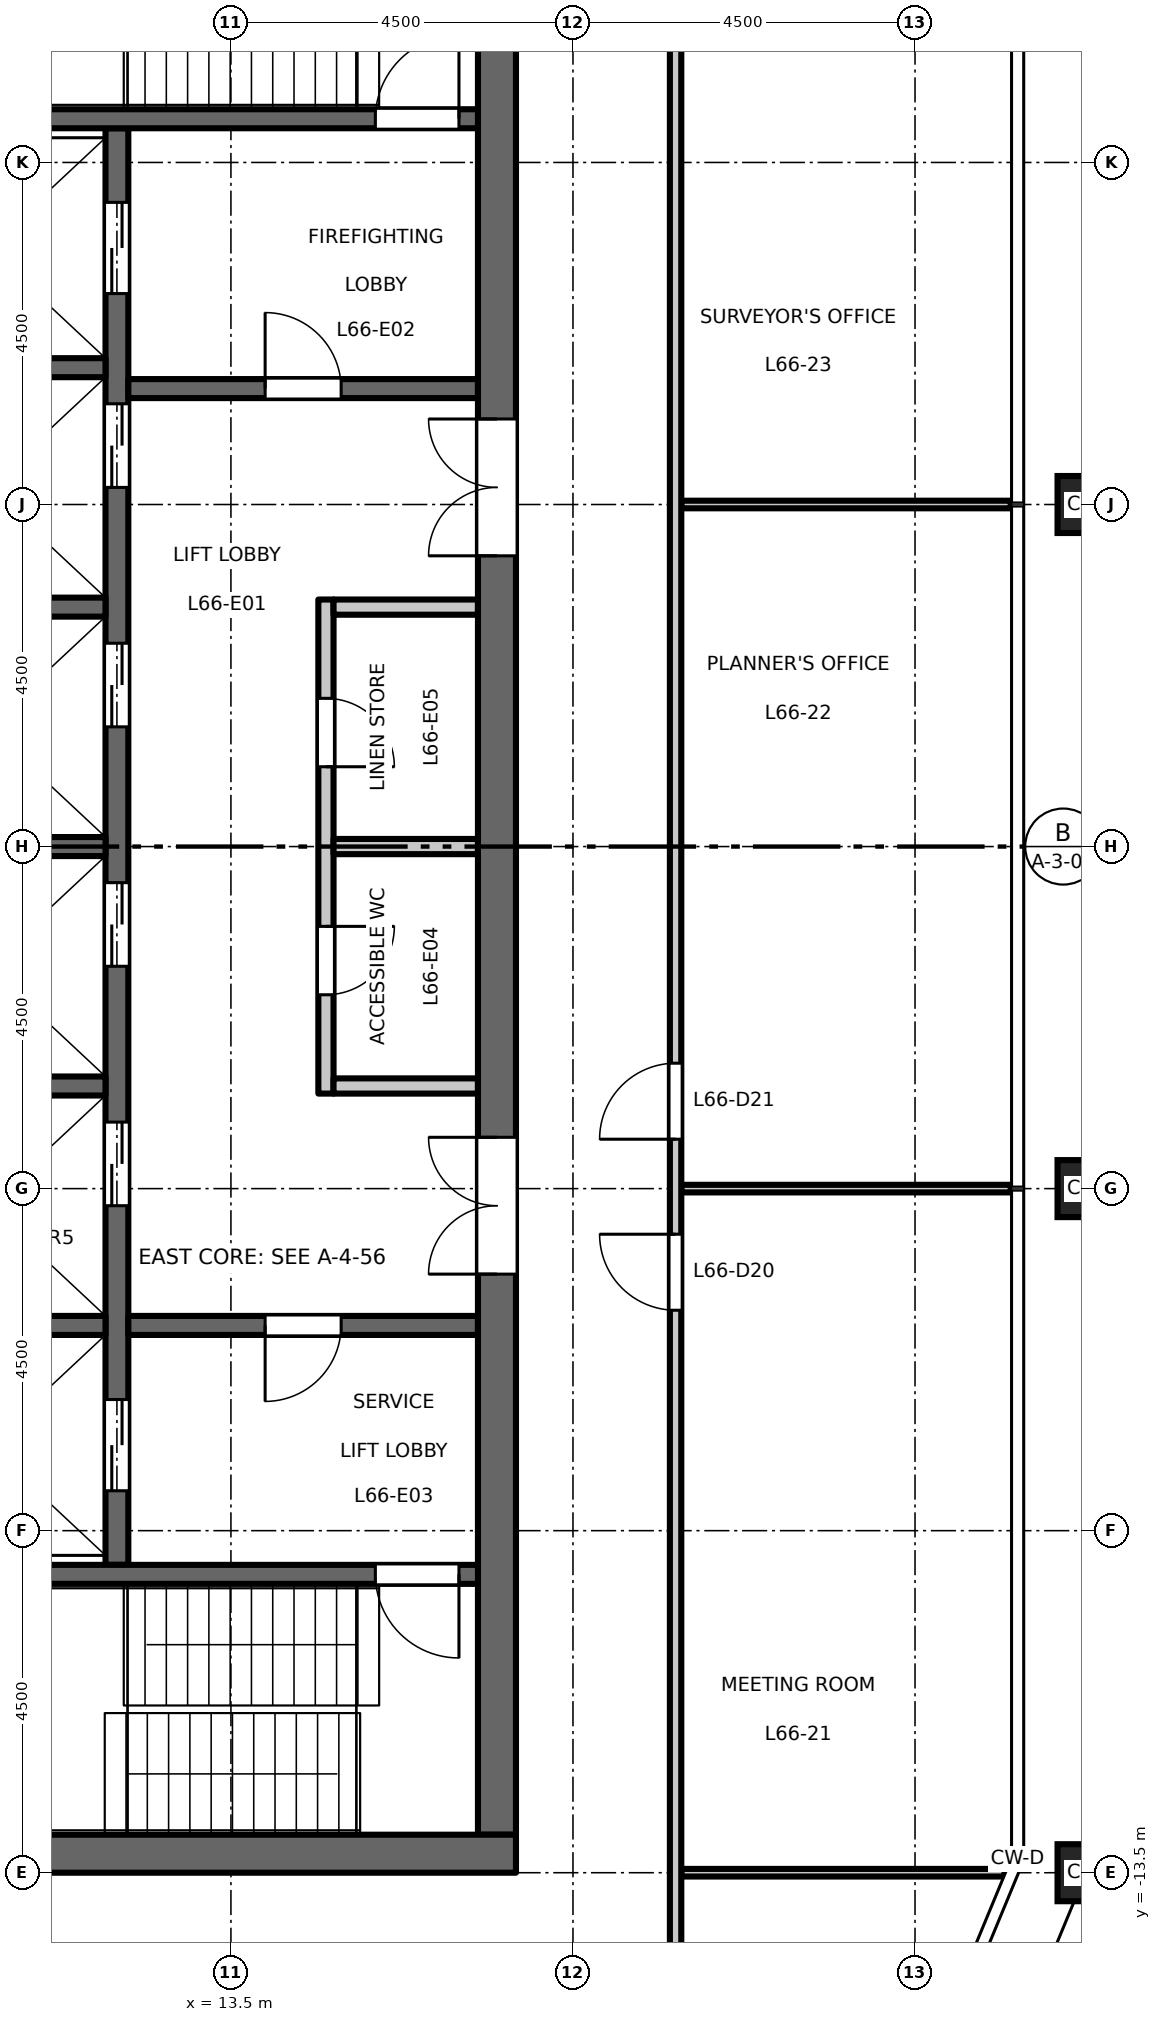
"""IFC4 building model, lengths in metres.
Left out: names, types, materials, properties, quantities, classifications, styles, units other than length and angle.
Written with IfcOpenShell. Run it as: python <this file> out.ifc"""

import sys

from ifc_helpers import new_model, si_unit, direction, frame, frame_2d, origin, origin_2d, place, context, subcontext, project, spatial, rectangle, hollow_rectangle, extrude, element, fill, save


model = new_model("IFC4")
c1 = context("Model", 3, precision=1e-05, world=origin(), true_north=direction((0.0, 1.0)))
c2 = subcontext(c1, "Body", "Model", "MODEL_VIEW")
j1 = project(units=[si_unit("LENGTHUNIT", "METRE"), si_unit("PLANEANGLEUNIT", "RADIAN")], contexts=[c1])
p1 = place(None, origin())
s1 = spatial("IfcSite", under=j1, at=p1, CompositionType="ELEMENT")
p2 = place(p1, origin())
s2 = spatial("IfcBuilding", under=s1, at=p2, CompositionType="ELEMENT")
p3 = place(p2, frame((0.0, 0.0, 307.7)))
s3 = spatial("IfcBuildingStorey", under=s2, at=p3, CompositionType="ELEMENT", Elevation=307.7)
for number, where, z_axis, x_axis in (
    (1, (24.75, -13.5, 0.0), (0.0, 0.0, 1.0), (1.0, 0.0, 0.0)),
    (2, (24.75, -4.5, 0.0), (0.0, 0.0, 1.0), (1.0, 0.0, 0.0)),
    (3, (24.75, 4.5, 0.0), (0.0, 0.0, 1.0), (1.0, 0.0, 0.0)),
):
    element("IfcColumn", number, at=place(p3, frame(where, z_axis=z_axis, x_axis=x_axis)), inside=s3, PredefinedType="COLUMN", context=c2, shape_type="SweptSolid", body=[
        extrude(hollow_rectangle(XDim=0.75, YDim=0.75, WallThickness=0.04, at=origin_2d()), origin(), (0.0, 0.0, 1.0), 4.5),
    ])
p4 = place(p3, frame((14.75, -3.25, 0.0), z_axis=(0.0, 0.0, 1.0), x_axis=(0.0, 1.0, 0.0)))
e4 = element("IfcWall", 4, at=p4, inside=s3, PredefinedType="PARTITIONING", context=c2, shape_type="SweptSolid", body=[
    extrude(rectangle(XDim=6.5, YDim=0.2, at=frame_2d((3.25, 0.0))), origin(), (0.0, 0.0, 1.0), 4.35),
])
p5 = place(p4, frame((1.3, 0.0, 0.0)))
e5 = element("IfcOpeningElement", 5, at=p5, cuts=e4, PredefinedType="OPENING", context=c2, shape_type="SweptSolid", body=[
    extrude(rectangle(XDim=0.9, YDim=2.1, at=frame_2d((0.45, 1.05))), frame((0.0, 0.11, 0.0), z_axis=(0.0, -1.0, 0.0), x_axis=(1.0, 0.0, 0.0)), (0.0, 0.0, 1.0), 0.22),
])
p6 = place(p4, frame((4.3, 0.0, 0.0)))
e6 = element("IfcOpeningElement", 6, at=p6, cuts=e4, PredefinedType="OPENING", context=c2, shape_type="SweptSolid", body=[
    extrude(rectangle(XDim=0.9, YDim=2.1, at=frame_2d((0.45, 1.05))), frame((0.0, 0.11, 0.0), z_axis=(0.0, -1.0, 0.0), x_axis=(1.0, 0.0, 0.0)), (0.0, 0.0, 1.0), 0.22),
])
for number, where, z_axis, x_axis in (
    (7, (14.85, 3.15, 0.0), (0.0, 0.0, 1.0), (1.0, 0.0, 0.0)),
    (8, (14.85, -3.15, 0.0), (0.0, 0.0, 1.0), (1.0, 0.0, 0.0)),
    (9, (14.85, 0.0, 0.0), (0.0, 0.0, 1.0), (1.0, 0.0, 0.0)),
):
    element("IfcWall", number, at=place(p3, frame(where, z_axis=z_axis, x_axis=x_axis)), inside=s3, PredefinedType="PARTITIONING", context=c2, shape_type="SweptSolid", body=[
        extrude(rectangle(XDim=1.9, YDim=0.2, at=frame_2d((0.95, 0.0))), origin(), (0.0, 0.0, 1.0), 4.35),
    ])
p7 = place(p3, frame((12.0, -9.45, 0.0), z_axis=(0.0, 0.0, 1.0), x_axis=(0.0, 1.0, 0.0)))
e10 = element("IfcWall", 10, at=p7, inside=s3, PredefinedType="SHEAR", context=c2, shape_type="SweptSolid", body=[
    extrude(rectangle(XDim=18.9, YDim=0.3, at=frame_2d((9.45, 0.0))), origin(), (0.0, 0.0, 1.0), 4.35),
])
p8 = place(p7, frame((4.725, 0.0, 0.0)))
e11 = element("IfcOpeningElement", 11, at=p8, cuts=e10, PredefinedType="OPENING", context=c2, shape_type="SweptSolid", body=[
    extrude(rectangle(XDim=1.1, YDim=2.1, at=frame_2d((0.55, 1.05))), frame((0.0, 0.16, 0.0), z_axis=(0.0, -1.0, 0.0), x_axis=(1.0, 0.0, 0.0)), (0.0, 0.0, 1.0), 0.32),
])
p9 = place(p7, frame((7.875, 0.0, 0.0)))
e12 = element("IfcOpeningElement", 12, at=p9, cuts=e10, PredefinedType="OPENING", context=c2, shape_type="SweptSolid", body=[
    extrude(rectangle(XDim=1.1, YDim=2.1, at=frame_2d((0.55, 1.05))), frame((0.0, 0.16, 0.0), z_axis=(0.0, -1.0, 0.0), x_axis=(1.0, 0.0, 0.0)), (0.0, 0.0, 1.0), 0.32),
])
p10 = place(p7, frame((11.025, 0.0, 0.0)))
e13 = element("IfcOpeningElement", 13, at=p10, cuts=e10, PredefinedType="OPENING", context=c2, shape_type="SweptSolid", body=[
    extrude(rectangle(XDim=1.1, YDim=2.1, at=frame_2d((0.55, 1.05))), frame((0.0, 0.16, 0.0), z_axis=(0.0, -1.0, 0.0), x_axis=(1.0, 0.0, 0.0)), (0.0, 0.0, 1.0), 0.32),
])
p11 = place(p7, frame((14.175, 0.0, 0.0)))
e14 = element("IfcOpeningElement", 14, at=p11, cuts=e10, PredefinedType="OPENING", context=c2, shape_type="SweptSolid", body=[
    extrude(rectangle(XDim=1.1, YDim=2.1, at=frame_2d((0.55, 1.05))), frame((0.0, 0.16, 0.0), z_axis=(0.0, -1.0, 0.0), x_axis=(1.0, 0.0, 0.0)), (0.0, 0.0, 1.0), 0.32),
])
p12 = place(p7, frame((16.725, 0.0, 0.0)))
e15 = element("IfcOpeningElement", 15, at=p12, cuts=e10, PredefinedType="OPENING", context=c2, shape_type="SweptSolid", body=[
    extrude(rectangle(XDim=1.2, YDim=2.1, at=frame_2d((0.6, 1.05))), frame((0.0, 0.16, 0.0), z_axis=(0.0, -1.0, 0.0), x_axis=(1.0, 0.0, 0.0)), (0.0, 0.0, 1.0), 0.32),
])
p13 = place(p7, frame((0.975, 0.0, 0.0)))
e16 = element("IfcOpeningElement", 16, at=p13, cuts=e10, PredefinedType="OPENING", context=c2, shape_type="SweptSolid", body=[
    extrude(rectangle(XDim=1.2, YDim=2.1, at=frame_2d((0.6, 1.05))), frame((0.0, 0.16, 0.0), z_axis=(0.0, -1.0, 0.0), x_axis=(1.0, 0.0, 0.0)), (0.0, 0.0, 1.0), 0.32),
])
p14 = place(p3, frame((12.15, 6.025, 0.0), z_axis=(0.0, 0.0, 1.0), x_axis=(1.0, 0.0, 0.0)))
e17 = element("IfcWall", 17, at=p14, inside=s3, PredefinedType="SHEAR", context=c2, shape_type="SweptSolid", body=[
    extrude(rectangle(XDim=4.6, YDim=0.25, at=frame_2d((2.3, 0.0))), origin(), (0.0, 0.0, 1.0), 4.35),
])
p15 = place(p14, frame((1.8, 0.0, 0.0)))
e18 = element("IfcOpeningElement", 18, at=p15, cuts=e17, PredefinedType="OPENING", context=c2, shape_type="SweptSolid", body=[
    extrude(rectangle(XDim=1.0, YDim=2.1, at=frame_2d((0.5, 1.05))), frame((0.0, 0.135, 0.0), z_axis=(0.0, -1.0, 0.0), x_axis=(1.0, 0.0, 0.0)), (0.0, 0.0, 1.0), 0.27),
])
p16 = place(p3, frame((12.15, -6.3, 0.0), z_axis=(0.0, 0.0, 1.0), x_axis=(1.0, 0.0, 0.0)))
e19 = element("IfcWall", 19, at=p16, inside=s3, PredefinedType="SHEAR", context=c2, shape_type="SweptSolid", body=[
    extrude(rectangle(XDim=4.6, YDim=0.25, at=frame_2d((2.3, 0.0))), origin(), (0.0, 0.0, 1.0), 4.35),
])
p17 = place(p16, frame((1.8, 0.0, 0.0)))
e20 = element("IfcOpeningElement", 20, at=p17, cuts=e19, PredefinedType="OPENING", context=c2, shape_type="SweptSolid", body=[
    extrude(rectangle(XDim=1.0, YDim=2.1, at=frame_2d((0.5, 1.05))), frame((0.0, 0.135, 0.0), z_axis=(0.0, -1.0, 0.0), x_axis=(1.0, 0.0, 0.0)), (0.0, 0.0, 1.0), 0.27),
])
p18 = place(p3, frame((17.0, -13.0, 0.0), z_axis=(0.0, 0.0, 1.0), x_axis=(0.0, 1.0, 0.0)))
e21 = element("IfcWall", 21, at=p18, inside=s3, PredefinedType="SHEAR", context=c2, shape_type="SweptSolid", body=[
    extrude(rectangle(XDim=26.0, YDim=0.5, at=frame_2d((13.0, 0.0))), origin(), (0.0, 0.0, 1.0), 4.35),
])
p19 = place(p18, frame((16.825, 0.0, 0.0)))
e22 = element("IfcOpeningElement", 22, at=p19, cuts=e21, PredefinedType="OPENING", context=c2, shape_type="SweptSolid", body=[
    extrude(rectangle(XDim=1.8, YDim=2.1, at=frame_2d((0.9, 1.05))), frame((0.0, 0.26, 0.0), z_axis=(0.0, -1.0, 0.0), x_axis=(1.0, 0.0, 0.0)), (0.0, 0.0, 1.0), 0.52),
])
p20 = place(p18, frame((7.375, 0.0, 0.0)))
e23 = element("IfcOpeningElement", 23, at=p20, cuts=e21, PredefinedType="OPENING", context=c2, shape_type="SweptSolid", body=[
    extrude(rectangle(XDim=1.8, YDim=2.1, at=frame_2d((0.9, 1.05))), frame((0.0, 0.26, 0.0), z_axis=(0.0, -1.0, 0.0), x_axis=(1.0, 0.0, 0.0)), (0.0, 0.0, 1.0), 0.52),
])
for number, where, z_axis, x_axis in (
    (24, (8.75, 0.0, 0.0), (0.0, 0.0, 1.0), (1.0, 0.0, 0.0)),
    (25, (8.75, 3.15, 0.0), (0.0, 0.0, 1.0), (1.0, 0.0, 0.0)),
    (26, (8.75, 6.3, 0.0), (0.0, 0.0, 1.0), (1.0, 0.0, 0.0)),
    (27, (8.75, -3.15, 0.0), (0.0, 0.0, 1.0), (1.0, 0.0, 0.0)),
    (28, (8.75, -6.3, 0.0), (0.0, 0.0, 1.0), (1.0, 0.0, 0.0)),
):
    element("IfcWall", number, at=place(p3, frame(where, z_axis=z_axis, x_axis=x_axis)), inside=s3, PredefinedType="SHEAR", context=c2, shape_type="SweptSolid", body=[
        extrude(rectangle(XDim=3.1, YDim=0.25, at=frame_2d((1.55, 0.0))), origin(), (0.0, 0.0, 1.0), 4.35),
    ])
p21 = place(p3, frame((8.75, 9.575, 0.0), z_axis=(0.0, 0.0, 1.0), x_axis=(1.0, 0.0, 0.0)))
e29 = element("IfcWall", 29, at=p21, inside=s3, PredefinedType="SHEAR", context=c2, shape_type="SweptSolid", body=[
    extrude(rectangle(XDim=8.0, YDim=0.25, at=frame_2d((4.0, 0.0))), origin(), (0.0, 0.0, 1.0), 4.35),
])
p22 = place(p21, frame((6.65, 0.0, 0.0)))
e30 = element("IfcOpeningElement", 30, at=p22, cuts=e29, PredefinedType="OPENING", context=c2, shape_type="SweptSolid", body=[
    extrude(rectangle(XDim=1.1, YDim=2.1, at=frame_2d((0.55, 1.05))), frame((0.0, 0.135, 0.0), z_axis=(0.0, -1.0, 0.0), x_axis=(1.0, 0.0, 0.0)), (0.0, 0.0, 1.0), 0.27),
])
p23 = place(p3, frame((8.75, -9.575, 0.0), z_axis=(0.0, 0.0, 1.0), x_axis=(1.0, 0.0, 0.0)))
e31 = element("IfcWall", 31, at=p23, inside=s3, PredefinedType="SHEAR", context=c2, shape_type="SweptSolid", body=[
    extrude(rectangle(XDim=8.0, YDim=0.25, at=frame_2d((4.0, 0.0))), origin(), (0.0, 0.0, 1.0), 4.35),
])
p24 = place(p23, frame((6.65, 0.0, 0.0)))
e32 = element("IfcOpeningElement", 32, at=p24, cuts=e31, PredefinedType="OPENING", context=c2, shape_type="SweptSolid", body=[
    extrude(rectangle(XDim=1.1, YDim=2.1, at=frame_2d((0.55, 1.05))), frame((0.0, 0.135, 0.0), z_axis=(0.0, -1.0, 0.0), x_axis=(1.0, 0.0, 0.0)), (0.0, 0.0, 1.0), 0.27),
])
p25 = place(p3, frame((8.25, -13.25, 0.0), z_axis=(0.0, 0.0, 1.0), x_axis=(1.0, 0.0, 0.0)))
e33 = element("IfcWall", 33, at=p25, inside=s3, PredefinedType="SHEAR", context=c2, shape_type="SweptSolid", body=[
    extrude(rectangle(XDim=9.0, YDim=0.5, at=frame_2d((4.5, 0.0))), origin(), (0.0, 0.0, 1.0), 4.35),
])
p26 = place(p3, frame((19.425, -13.5, 0.0), z_axis=(0.0, 0.0, 1.0), x_axis=(1.0, 0.0, 0.0)))
e34 = element("IfcWall", 34, at=p26, inside=s3, PredefinedType="PARTITIONING", context=c2, shape_type="SweptSolid", body=[
    extrude(rectangle(XDim=4.253, YDim=0.1, at=frame_2d((2.126, 0.0))), origin(), (0.0, 0.0, 1.0), 4.35),
])
for number, where, z_axis, x_axis in (
    (35, (19.425, -4.5, 0.0), (0.0, 0.0, 1.0), (1.0, 0.0, 0.0)),
    (36, (19.425, 4.5, 0.0), (0.0, 0.0, 1.0), (1.0, 0.0, 0.0)),
):
    element("IfcWall", number, at=place(p3, frame(where, z_axis=z_axis, x_axis=x_axis)), inside=s3, PredefinedType="PARTITIONING", context=c2, shape_type="SweptSolid", body=[
        extrude(rectangle(XDim=4.335, YDim=0.1, at=frame_2d((2.167, 0.0))), origin(), (0.0, 0.0, 1.0), 4.35),
    ])
p27 = place(p3, frame((19.35, -15.525, 0.0), z_axis=(0.0, 0.0, 1.0), x_axis=(0.0, 1.0, 0.0)))
e37 = element("IfcWall", 37, at=p27, inside=s3, PredefinedType="PARTITIONING", context=c2, shape_type="SweptSolid", body=[
    extrude(rectangle(XDim=31.05, YDim=0.15, at=frame_2d((15.525, 0.0))), origin(), (0.0, 0.0, 1.0), 4.35),
])
p28 = place(p27, frame((9.425, 0.0, 0.0)))
e38 = element("IfcOpeningElement", 38, at=p28, cuts=e37, PredefinedType="OPENING", context=c2, shape_type="SweptSolid", body=[
    extrude(rectangle(XDim=1.0, YDim=2.1, at=frame_2d((0.5, 1.05))), frame((0.0, 0.085, 0.0), z_axis=(0.0, -1.0, 0.0), x_axis=(1.0, 0.0, 0.0)), (0.0, 0.0, 1.0), 0.17),
])
p29 = place(p27, frame((11.675, 0.0, 0.0)))
e39 = element("IfcOpeningElement", 39, at=p29, cuts=e37, PredefinedType="OPENING", context=c2, shape_type="SweptSolid", body=[
    extrude(rectangle(XDim=1.0, YDim=2.1, at=frame_2d((0.5, 1.05))), frame((0.0, 0.085, 0.0), z_axis=(0.0, -1.0, 0.0), x_axis=(1.0, 0.0, 0.0)), (0.0, 0.0, 1.0), 0.17),
])
p30 = place(p27, frame((27.425, 0.0, 0.0)))
e40 = element("IfcOpeningElement", 40, at=p30, cuts=e37, PredefinedType="OPENING", context=c2, shape_type="SweptSolid", body=[
    extrude(rectangle(XDim=1.0, YDim=2.1, at=frame_2d((0.5, 1.05))), frame((0.0, 0.085, 0.0), z_axis=(0.0, -1.0, 0.0), x_axis=(1.0, 0.0, 0.0)), (0.0, 0.0, 1.0), 0.17),
])
p31 = place(p15, origin())
e41 = element("IfcDoor", 41, at=p31, inside=s3, OperationType="SINGLE_SWING_RIGHT", PredefinedType="DOOR", context=c2, shape_type="SweptSolid", body=[
    extrude(rectangle(XDim=1.0, YDim=2.1, at=frame_2d((0.5, 1.05))), frame((0.0, 0.025, 0.0), z_axis=(0.0, -1.0, 0.0), x_axis=(1.0, 0.0, 0.0)), (0.0, 0.0, 1.0), 0.05),
])
fill(e18, e41)
p32 = place(p17, origin())
e42 = element("IfcDoor", 42, at=p32, inside=s3, OperationType="SINGLE_SWING_LEFT", PredefinedType="DOOR", context=c2, shape_type="SweptSolid", body=[
    extrude(rectangle(XDim=1.0, YDim=2.1, at=frame_2d((0.5, 1.05))), frame((0.0, 0.025, 0.0), z_axis=(0.0, -1.0, 0.0), x_axis=(1.0, 0.0, 0.0)), (0.0, 0.0, 1.0), 0.05),
])
fill(e20, e42)
p33 = place(p22, origin())
e43 = element("IfcDoor", 43, at=p33, inside=s3, OperationType="SINGLE_SWING_LEFT", PredefinedType="DOOR", context=c2, shape_type="SweptSolid", body=[
    extrude(rectangle(XDim=1.1, YDim=2.1, at=frame_2d((0.55, 1.05))), frame((0.0, 0.025, 0.0), z_axis=(0.0, -1.0, 0.0), x_axis=(1.0, 0.0, 0.0)), (0.0, 0.0, 1.0), 0.05),
])
fill(e30, e43)
p34 = place(p24, origin())
e44 = element("IfcDoor", 44, at=p34, inside=s3, OperationType="SINGLE_SWING_RIGHT", PredefinedType="DOOR", context=c2, shape_type="SweptSolid", body=[
    extrude(rectangle(XDim=1.1, YDim=2.1, at=frame_2d((0.55, 1.05))), frame((0.0, 0.025, 0.0), z_axis=(0.0, -1.0, 0.0), x_axis=(1.0, 0.0, 0.0)), (0.0, 0.0, 1.0), 0.05),
])
fill(e32, e44)
p35 = place(p19, origin())
e45 = element("IfcDoor", 45, at=p35, inside=s3, OperationType="DOUBLE_DOOR_DOUBLE_SWING", PredefinedType="DOOR", context=c2, shape_type="SweptSolid", body=[
    extrude(rectangle(XDim=1.8, YDim=2.1, at=frame_2d((0.9, 1.05))), frame((0.0, 0.025, 0.0), z_axis=(0.0, -1.0, 0.0), x_axis=(1.0, 0.0, 0.0)), (0.0, 0.0, 1.0), 0.05),
])
fill(e22, e45)
p36 = place(p20, origin())
e46 = element("IfcDoor", 46, at=p36, inside=s3, OperationType="DOUBLE_DOOR_DOUBLE_SWING", PredefinedType="DOOR", context=c2, shape_type="SweptSolid", body=[
    extrude(rectangle(XDim=1.8, YDim=2.1, at=frame_2d((0.9, 1.05))), frame((0.0, 0.025, 0.0), z_axis=(0.0, -1.0, 0.0), x_axis=(1.0, 0.0, 0.0)), (0.0, 0.0, 1.0), 0.05),
])
fill(e23, e46)
p37 = place(p8, origin())
e47 = element("IfcDoor", 47, at=p37, inside=s3, OperationType="DOUBLE_DOOR_SLIDING", PredefinedType="DOOR", context=c2, shape_type="SweptSolid", body=[
    extrude(rectangle(XDim=1.1, YDim=2.1, at=frame_2d((0.55, 1.05))), frame((0.0, 0.025, 0.0), z_axis=(0.0, -1.0, 0.0), x_axis=(1.0, 0.0, 0.0)), (0.0, 0.0, 1.0), 0.05),
])
fill(e11, e47)
p38 = place(p9, origin())
e48 = element("IfcDoor", 48, at=p38, inside=s3, OperationType="DOUBLE_DOOR_SLIDING", PredefinedType="DOOR", context=c2, shape_type="SweptSolid", body=[
    extrude(rectangle(XDim=1.1, YDim=2.1, at=frame_2d((0.55, 1.05))), frame((0.0, 0.025, 0.0), z_axis=(0.0, -1.0, 0.0), x_axis=(1.0, 0.0, 0.0)), (0.0, 0.0, 1.0), 0.05),
])
fill(e12, e48)
p39 = place(p10, origin())
e49 = element("IfcDoor", 49, at=p39, inside=s3, OperationType="DOUBLE_DOOR_SLIDING", PredefinedType="DOOR", context=c2, shape_type="SweptSolid", body=[
    extrude(rectangle(XDim=1.1, YDim=2.1, at=frame_2d((0.55, 1.05))), frame((0.0, 0.025, 0.0), z_axis=(0.0, -1.0, 0.0), x_axis=(1.0, 0.0, 0.0)), (0.0, 0.0, 1.0), 0.05),
])
fill(e13, e49)
p40 = place(p11, origin())
e50 = element("IfcDoor", 50, at=p40, inside=s3, OperationType="DOUBLE_DOOR_SLIDING", PredefinedType="DOOR", context=c2, shape_type="SweptSolid", body=[
    extrude(rectangle(XDim=1.1, YDim=2.1, at=frame_2d((0.55, 1.05))), frame((0.0, 0.025, 0.0), z_axis=(0.0, -1.0, 0.0), x_axis=(1.0, 0.0, 0.0)), (0.0, 0.0, 1.0), 0.05),
])
fill(e14, e50)
p41 = place(p12, origin())
e51 = element("IfcDoor", 51, at=p41, inside=s3, OperationType="DOUBLE_DOOR_SLIDING", PredefinedType="DOOR", context=c2, shape_type="SweptSolid", body=[
    extrude(rectangle(XDim=1.2, YDim=2.1, at=frame_2d((0.6, 1.05))), frame((0.0, 0.025, 0.0), z_axis=(0.0, -1.0, 0.0), x_axis=(1.0, 0.0, 0.0)), (0.0, 0.0, 1.0), 0.05),
])
fill(e15, e51)
p42 = place(p13, origin())
e52 = element("IfcDoor", 52, at=p42, inside=s3, OperationType="DOUBLE_DOOR_SLIDING", PredefinedType="DOOR", context=c2, shape_type="SweptSolid", body=[
    extrude(rectangle(XDim=1.2, YDim=2.1, at=frame_2d((0.6, 1.05))), frame((0.0, 0.025, 0.0), z_axis=(0.0, -1.0, 0.0), x_axis=(1.0, 0.0, 0.0)), (0.0, 0.0, 1.0), 0.05),
])
fill(e16, e52)
p43 = place(p5, origin())
e53 = element("IfcDoor", 53, at=p43, inside=s3, OperationType="SINGLE_SWING_RIGHT", PredefinedType="DOOR", context=c2, shape_type="SweptSolid", body=[
    extrude(rectangle(XDim=0.9, YDim=2.1, at=frame_2d((0.45, 1.05))), frame((0.0, 0.025, 0.0), z_axis=(0.0, -1.0, 0.0), x_axis=(1.0, 0.0, 0.0)), (0.0, 0.0, 1.0), 0.05),
])
fill(e5, e53)
p44 = place(p6, origin())
e54 = element("IfcDoor", 54, at=p44, inside=s3, OperationType="SINGLE_SWING_LEFT", PredefinedType="DOOR", context=c2, shape_type="SweptSolid", body=[
    extrude(rectangle(XDim=0.9, YDim=2.1, at=frame_2d((0.45, 1.05))), frame((0.0, 0.025, 0.0), z_axis=(0.0, -1.0, 0.0), x_axis=(1.0, 0.0, 0.0)), (0.0, 0.0, 1.0), 0.05),
])
fill(e6, e54)
p45 = place(p28, origin())
e55 = element("IfcDoor", 55, at=p45, inside=s3, OperationType="SINGLE_SWING_RIGHT", PredefinedType="DOOR", context=c2, shape_type="SweptSolid", body=[
    extrude(rectangle(XDim=1.0, YDim=2.1, at=frame_2d((0.5, 1.05))), frame((0.0, 0.025, 0.0), z_axis=(0.0, -1.0, 0.0), x_axis=(1.0, 0.0, 0.0)), (0.0, 0.0, 1.0), 0.05),
])
fill(e38, e55)
p46 = place(p29, origin())
e56 = element("IfcDoor", 56, at=p46, inside=s3, OperationType="SINGLE_SWING_LEFT", PredefinedType="DOOR", context=c2, shape_type="SweptSolid", body=[
    extrude(rectangle(XDim=1.0, YDim=2.1, at=frame_2d((0.5, 1.05))), frame((0.0, 0.025, 0.0), z_axis=(0.0, -1.0, 0.0), x_axis=(1.0, 0.0, 0.0)), (0.0, 0.0, 1.0), 0.05),
])
fill(e39, e56)
save(model, sys.argv[1])
